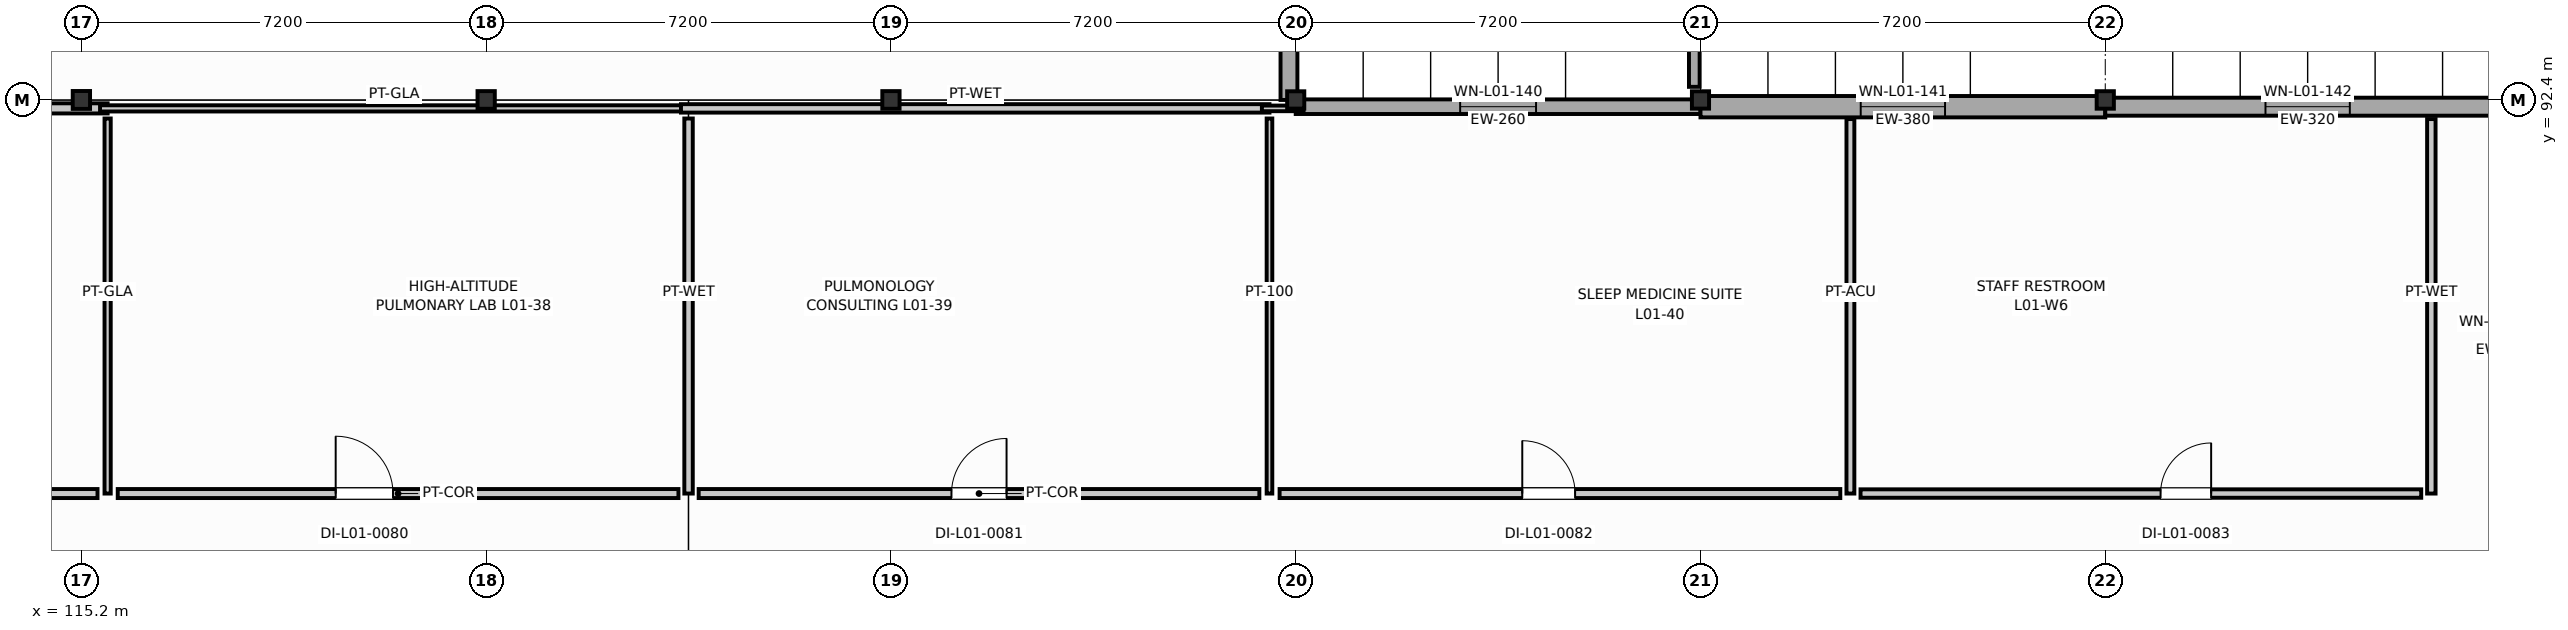
"""IFC4 building model, lengths in metres.
Left out: names, types, materials, properties, quantities, classifications, styles, units other than length and angle.
Written with IfcOpenShell. Run it as: python <this file> out.ifc"""

import sys

from ifc_helpers import new_model, si_unit, direction, frame, frame_2d, origin, origin_2d, place, context, subcontext, project, spatial, rectangle, i_section, extrude, element, fill, save


model = new_model("IFC4")
c1 = context("Model", 3, precision=1e-05, world=origin(), true_north=direction((0.0, 1.0)))
c2 = subcontext(c1, "Body", "Model", "MODEL_VIEW")
j1 = project(units=[si_unit("LENGTHUNIT", "METRE"), si_unit("PLANEANGLEUNIT", "RADIAN")], contexts=[c1])
p1 = place(None, origin())
s1 = spatial("IfcSite", under=j1, at=p1, CompositionType="ELEMENT")
p2 = place(p1, origin())
s2 = spatial("IfcBuilding", under=s1, at=p2, CompositionType="ELEMENT")
p3 = place(p2, frame((0.0, 0.0, 4.8)))
s3 = spatial("IfcBuildingStorey", under=s2, at=p3, CompositionType="ELEMENT", Elevation=4.8)
p4 = place(p3, frame((115.2, 92.4, 0.0), z_axis=(0.0, 0.0, 1.0), x_axis=(1.0, 0.0, 0.0)))
e1 = element("IfcColumn", 1, at=p4, inside=s3, PredefinedType="COLUMN", context=c2, shape_type="SweptSolid", body=[
    extrude(i_section(OverallWidth=0.308, OverallDepth=0.318, WebThickness=0.013, FlangeThickness=0.021, FilletRadius=0.016, at=origin_2d()), origin(), (0.0, 0.0, 1.0), 4.2),
])
for number, where, z_axis, x_axis in (
    (2, (122.4, 92.4, 0.0), (0.0, 0.0, 1.0), (1.0, 0.0, 0.0)),
    (3, (129.6, 92.4, 0.0), (0.0, 0.0, 1.0), (1.0, 0.0, 0.0)),
):
    element("IfcColumn", number, at=place(p3, frame(where, z_axis=z_axis, x_axis=x_axis)), inside=s3, PredefinedType="COLUMN", context=c2, shape_type="SweptSolid", body=[
        extrude(i_section(OverallWidth=0.307, OverallDepth=0.314, WebThickness=0.012, FlangeThickness=0.019, FilletRadius=0.016, at=origin_2d()), origin(), (0.0, 0.0, 1.0), 4.2),
    ])
for number, where, z_axis, x_axis in (
    (4, (136.8, 92.4, 0.0), (0.0, 0.0, 1.0), (1.0, 0.0, 0.0)),
    (5, (144.0, 92.4, 0.0), (0.0, 0.0, 1.0), (1.0, 0.0, 0.0)),
):
    element("IfcColumn", number, at=place(p3, frame(where, z_axis=z_axis, x_axis=x_axis)), inside=s3, PredefinedType="COLUMN", context=c2, shape_type="SweptSolid", body=[
        extrude(i_section(OverallWidth=0.305, OverallDepth=0.308, WebThickness=0.01, FlangeThickness=0.015, FilletRadius=0.015, at=origin_2d()), origin(), (0.0, 0.0, 1.0), 4.2),
    ])
p5 = place(p3, frame((151.2, 92.4, 0.0), z_axis=(0.0, 0.0, 1.0), x_axis=(1.0, 0.0, 0.0)))
e6 = element("IfcColumn", 6, at=p5, inside=s3, PredefinedType="COLUMN", context=c2, shape_type="SweptSolid", body=[
    extrude(i_section(OverallWidth=0.306, OverallDepth=0.311, WebThickness=0.011, FlangeThickness=0.017, FilletRadius=0.015, at=origin_2d()), origin(), (0.0, 0.0, 1.0), 4.2),
])
p6 = place(p3, frame((136.68, 92.4, 0.0), z_axis=(0.0, 0.0, 1.0), x_axis=(0.0, 1.0, 0.0)))
e7 = element("IfcWall", 7, at=p6, inside=s3, PredefinedType="SOLIDWALL", context=c2, shape_type="SweptSolid", body=[
    extrude(rectangle(XDim=8.4, YDim=0.3, at=frame_2d((4.2, 0.0))), origin(), (0.0, 0.0, 1.0), 3.015),
])
p7 = place(p6, frame((3.525, 0.0, 0.95)))
e8 = element("IfcOpeningElement", 8, at=p7, cuts=e7, PredefinedType="OPENING", context=c2, shape_type="SweptSolid", body=[
    extrude(rectangle(XDim=1.35, YDim=1.35, at=frame_2d((0.675, 0.675))), frame((0.0, 0.16, 0.0), z_axis=(0.0, -1.0, 0.0), x_axis=(1.0, 0.0, 0.0)), (0.0, 0.0, 1.0), 0.32),
])
p8 = place(p3, frame((136.8, 92.28, 0.0), z_axis=(0.0, 0.0, 1.0), x_axis=(1.0, 0.0, 0.0)))
e9 = element("IfcWall", 9, at=p8, inside=s3, PredefinedType="SOLIDWALL", context=c2, shape_type="SweptSolid", body=[
    extrude(rectangle(XDim=7.2, YDim=0.26, at=frame_2d((3.6, 0.0))), origin(), (0.0, 0.0, 1.0), 3.249),
])
p9 = place(p8, frame((2.925, 0.0, 0.95)))
e10 = element("IfcOpeningElement", 10, at=p9, cuts=e9, PredefinedType="OPENING", context=c2, shape_type="SweptSolid", body=[
    extrude(rectangle(XDim=1.35, YDim=1.75, at=frame_2d((0.675, 0.875))), frame((0.0, 0.14, 0.0), z_axis=(0.0, -1.0, 0.0), x_axis=(1.0, 0.0, 0.0)), (0.0, 0.0, 1.0), 0.28),
])
p10 = place(p3, frame((144.0, 92.28, 0.0), z_axis=(0.0, 0.0, 1.0), x_axis=(1.0, 0.0, 0.0)))
e11 = element("IfcWall", 11, at=p10, inside=s3, PredefinedType="SOLIDWALL", context=c2, shape_type="SweptSolid", body=[
    extrude(rectangle(XDim=7.2, YDim=0.38, at=frame_2d((3.6, 0.0))), origin(), (0.0, 0.0, 1.0), 3.249),
])
p11 = place(p10, frame((2.85, 0.0, 0.95)))
e12 = element("IfcOpeningElement", 12, at=p11, cuts=e11, PredefinedType="OPENING", context=c2, shape_type="SweptSolid", body=[
    extrude(rectangle(XDim=1.5, YDim=1.15, at=frame_2d((0.75, 0.575))), frame((0.0, 0.2, 0.0), z_axis=(0.0, -1.0, 0.0), x_axis=(1.0, 0.0, 0.0)), (0.0, 0.0, 1.0), 0.4),
])
p12 = place(p3, frame((151.2, 92.28, 0.0), z_axis=(0.0, 0.0, 1.0), x_axis=(1.0, 0.0, 0.0)))
e13 = element("IfcWall", 13, at=p12, inside=s3, PredefinedType="SOLIDWALL", context=c2, shape_type="SweptSolid", body=[
    extrude(rectangle(XDim=7.2, YDim=0.32, at=frame_2d((3.6, 0.0))), origin(), (0.0, 0.0, 1.0), 3.254),
])
p13 = place(p12, frame((2.85, 0.0, 0.95)))
e14 = element("IfcOpeningElement", 14, at=p13, cuts=e13, PredefinedType="OPENING", context=c2, shape_type="SweptSolid", body=[
    extrude(rectangle(XDim=1.5, YDim=1.35, at=frame_2d((0.75, 0.675))), frame((0.0, 0.17, 0.0), z_axis=(0.0, -1.0, 0.0), x_axis=(1.0, 0.0, 0.0)), (0.0, 0.0, 1.0), 0.34),
])
p14 = place(p3, frame((143.89, 108.98, 0.0), z_axis=(0.0, 0.0, 1.0), x_axis=(0.0, -1.0, 0.0)))
e15 = element("IfcWall", 15, at=p14, inside=s3, PredefinedType="PARAPET", context=c2, shape_type="SweptSolid", body=[
    extrude(rectangle(XDim=16.347, YDim=0.19, at=frame_2d((8.173, 0.0))), origin(), (0.0, 0.0, 1.0), 1.15),
])
p15 = place(p3, frame((105.198, 92.25, 0.0), z_axis=(0.0, 0.0, 1.0), x_axis=(1.0, 0.0, 0.0)))
e16 = element("IfcWall", 16, at=p15, inside=s3, PredefinedType="PARTITIONING", context=c2, shape_type="SweptSolid", body=[
    extrude(rectangle(XDim=10.469, YDim=0.18, at=frame_2d((5.234, 0.0))), origin(), (0.0, 0.0, 1.0), 3.252),
])
p16 = place(p3, frame((115.667, 92.07, 0.0), z_axis=(0.0, 0.0, 1.0), x_axis=(0.0, -1.0, 0.0)))
e17 = element("IfcWall", 17, at=p16, inside=s3, PredefinedType="MOVABLE", context=c2, shape_type="SweptSolid", body=[
    extrude(rectangle(XDim=6.67, YDim=0.11, at=frame_2d((3.335, 0.0))), origin(), (0.0, 0.0, 1.0), 3.945),
])
p17 = place(p3, frame((115.487, 85.4, 0.0), z_axis=(0.0, 0.0, 1.0), x_axis=(-1.0, 0.0, 0.0)))
e18 = element("IfcWall", 18, at=p17, inside=s3, PredefinedType="PARTITIONING", context=c2, shape_type="SweptSolid", body=[
    extrude(rectangle(XDim=9.974, YDim=0.16, at=frame_2d((4.987, 0.0))), origin(), (0.0, 0.0, 1.0), 3.252),
])
p18 = place(p17, frame((4.657, 0.0, 0.0)))
e19 = element("IfcOpeningElement", 19, at=p18, cuts=e18, PredefinedType="OPENING", context=c2, shape_type="SweptSolid", body=[
    extrude(rectangle(XDim=1.06, YDim=2.05, at=frame_2d((0.53, 1.025))), frame((0.0, 0.09, 0.0), z_axis=(0.0, -1.0, 0.0), x_axis=(1.0, 0.0, 0.0)), (0.0, 0.0, 1.0), 0.18),
])
p19 = place(p3, frame((115.532, 92.25, 0.0), z_axis=(0.0, 0.0, 1.0), x_axis=(1.0, 0.0, 0.0)))
e20 = element("IfcWall", 20, at=p19, inside=s3, PredefinedType="MOVABLE", context=c2, shape_type="SweptSolid", body=[
    extrude(rectangle(XDim=10.468, YDim=0.11, at=frame_2d((5.234, 0.0))), origin(), (0.0, 0.0, 1.0), 3.401),
])
p20 = place(p3, frame((126.0, 92.07, 0.0), z_axis=(0.0, 0.0, 1.0), x_axis=(0.0, -1.0, 0.0)))
e21 = element("IfcWall", 21, at=p20, inside=s3, PredefinedType="PLUMBINGWALL", context=c2, shape_type="SweptSolid", body=[
    extrude(rectangle(XDim=6.67, YDim=0.15, at=frame_2d((3.335, 0.0))), origin(), (0.0, 0.0, 1.0), 3.587),
])
p21 = place(p3, frame((125.82, 85.4, 0.0), z_axis=(0.0, 0.0, 1.0), x_axis=(-1.0, 0.0, 0.0)))
e22 = element("IfcWall", 22, at=p21, inside=s3, PredefinedType="PARTITIONING", context=c2, shape_type="SweptSolid", body=[
    extrude(rectangle(XDim=9.973, YDim=0.16, at=frame_2d((4.987, 0.0))), origin(), (0.0, 0.0, 1.0), 3.401),
])
p22 = place(p21, frame((5.077, 0.0, 0.0)))
e23 = element("IfcOpeningElement", 23, at=p22, cuts=e22, PredefinedType="OPENING", context=c2, shape_type="SweptSolid", body=[
    extrude(rectangle(XDim=1.02, YDim=2.05, at=frame_2d((0.51, 1.025))), frame((0.0, 0.09, 0.0), z_axis=(0.0, -1.0, 0.0), x_axis=(1.0, 0.0, 0.0)), (0.0, 0.0, 1.0), 0.18),
])
p23 = place(p3, frame((125.865, 92.25, 0.0), z_axis=(0.0, 0.0, 1.0), x_axis=(1.0, 0.0, 0.0)))
e24 = element("IfcWall", 24, at=p23, inside=s3, PredefinedType="PLUMBINGWALL", context=c2, shape_type="SweptSolid", body=[
    extrude(rectangle(XDim=10.468, YDim=0.15, at=frame_2d((5.234, 0.0))), origin(), (0.0, 0.0, 1.0), 3.018),
])
p24 = place(p3, frame((136.333, 92.07, 0.0), z_axis=(0.0, 0.0, 1.0), x_axis=(0.0, -1.0, 0.0)))
e25 = element("IfcWall", 25, at=p24, inside=s3, PredefinedType="PARTITIONING", context=c2, shape_type="SweptSolid", body=[
    extrude(rectangle(XDim=6.67, YDim=0.1, at=frame_2d((3.335, 0.0))), origin(), (0.0, 0.0, 1.0), 3.945),
])
p25 = place(p3, frame((136.153, 85.4, 0.0), z_axis=(0.0, 0.0, 1.0), x_axis=(-1.0, 0.0, 0.0)))
e26 = element("IfcWall", 26, at=p25, inside=s3, PredefinedType="PARTITIONING", context=c2, shape_type="SweptSolid", body=[
    extrude(rectangle(XDim=9.973, YDim=0.16, at=frame_2d((4.987, 0.0))), origin(), (0.0, 0.0, 1.0), 3.094),
])
p26 = place(p25, frame((4.497, 0.0, 0.0)))
e27 = element("IfcOpeningElement", 27, at=p26, cuts=e26, PredefinedType="OPENING", context=c2, shape_type="SweptSolid", body=[
    extrude(rectangle(XDim=0.98, YDim=2.05, at=frame_2d((0.49, 1.025))), frame((0.0, 0.09, 0.0), z_axis=(0.0, -1.0, 0.0), x_axis=(1.0, 0.0, 0.0)), (0.0, 0.0, 1.0), 0.18),
])
p27 = place(p3, frame((136.198, 92.25, 0.0), z_axis=(0.0, 0.0, 1.0), x_axis=(1.0, 0.0, 0.0)))
e28 = element("IfcWall", 28, at=p27, inside=s3, PredefinedType="PARTITIONING", context=c2, shape_type="SweptSolid", body=[
    extrude(rectangle(XDim=0.742, YDim=0.1, at=frame_2d((0.371, 0.0))), origin(), (0.0, 0.0, 1.0), 3.018),
])
p28 = place(p3, frame((146.667, 92.06, 0.0), z_axis=(0.0, 0.0, 1.0), x_axis=(0.0, -1.0, 0.0)))
e29 = element("IfcWall", 29, at=p28, inside=s3, PredefinedType="PARTITIONING", context=c2, shape_type="SweptSolid", body=[
    extrude(rectangle(XDim=6.66, YDim=0.14, at=frame_2d((3.33, 0.0))), origin(), (0.0, 0.0, 1.0), 3.945),
])
p29 = place(p3, frame((146.487, 85.4, 0.0), z_axis=(0.0, 0.0, 1.0), x_axis=(-1.0, 0.0, 0.0)))
e30 = element("IfcWall", 30, at=p29, inside=s3, PredefinedType="PARTITIONING", context=c2, shape_type="SweptSolid", body=[
    extrude(rectangle(XDim=9.974, YDim=0.16, at=frame_2d((4.987, 0.0))), origin(), (0.0, 0.0, 1.0), 3.408),
])
p30 = place(p29, frame((4.717, 0.0, 0.0)))
e31 = element("IfcOpeningElement", 31, at=p30, cuts=e30, PredefinedType="OPENING", context=c2, shape_type="SweptSolid", body=[
    extrude(rectangle(XDim=0.94, YDim=2.05, at=frame_2d((0.47, 1.025))), frame((0.0, 0.09, 0.0), z_axis=(0.0, -1.0, 0.0), x_axis=(1.0, 0.0, 0.0)), (0.0, 0.0, 1.0), 0.18),
])
p31 = place(p3, frame((157.0, 92.06, 0.0), z_axis=(0.0, 0.0, 1.0), x_axis=(0.0, -1.0, 0.0)))
e32 = element("IfcWall", 32, at=p31, inside=s3, PredefinedType="PLUMBINGWALL", context=c2, shape_type="SweptSolid", body=[
    extrude(rectangle(XDim=6.66, YDim=0.15, at=frame_2d((3.33, 0.0))), origin(), (0.0, 0.0, 1.0), 3.945),
])
p32 = place(p3, frame((156.82, 85.4, 0.0), z_axis=(0.0, 0.0, 1.0), x_axis=(-1.0, 0.0, 0.0)))
e33 = element("IfcWall", 33, at=p32, inside=s3, PredefinedType="PLUMBINGWALL", context=c2, shape_type="SweptSolid", body=[
    extrude(rectangle(XDim=9.973, YDim=0.15, at=frame_2d((4.987, 0.0))), origin(), (0.0, 0.0, 1.0), 3.485),
])
p33 = place(p32, frame((3.737, 0.0, 0.0)))
e34 = element("IfcOpeningElement", 34, at=p33, cuts=e33, PredefinedType="OPENING", context=c2, shape_type="SweptSolid", body=[
    extrude(rectangle(XDim=0.9, YDim=2.1, at=frame_2d((0.45, 1.05))), frame((0.0, 0.085, 0.0), z_axis=(0.0, -1.0, 0.0), x_axis=(1.0, 0.0, 0.0)), (0.0, 0.0, 1.0), 0.17),
])
p34 = place(p9, origin())
e35 = element("IfcWindow", 35, at=p34, inside=s3, PartitioningType="SINGLE_PANEL", PredefinedType="WINDOW", context=c2, shape_type="SweptSolid", body=[
    extrude(rectangle(XDim=1.35, YDim=1.75, at=frame_2d((0.675, 0.875))), frame((0.0, 0.03, 0.0), z_axis=(0.0, -1.0, 0.0), x_axis=(1.0, 0.0, 0.0)), (0.0, 0.0, 1.0), 0.06),
])
fill(e10, e35)
p35 = place(p11, origin())
e36 = element("IfcWindow", 36, at=p35, inside=s3, PartitioningType="SINGLE_PANEL", PredefinedType="WINDOW", context=c2, shape_type="SweptSolid", body=[
    extrude(rectangle(XDim=1.5, YDim=1.15, at=frame_2d((0.75, 0.575))), frame((0.0, 0.03, 0.0), z_axis=(0.0, -1.0, 0.0), x_axis=(1.0, 0.0, 0.0)), (0.0, 0.0, 1.0), 0.06),
])
fill(e12, e36)
p36 = place(p13, origin())
e37 = element("IfcWindow", 37, at=p36, inside=s3, PartitioningType="SINGLE_PANEL", PredefinedType="WINDOW", context=c2, shape_type="SweptSolid", body=[
    extrude(rectangle(XDim=1.5, YDim=1.35, at=frame_2d((0.75, 0.675))), frame((0.0, 0.03, 0.0), z_axis=(0.0, -1.0, 0.0), x_axis=(1.0, 0.0, 0.0)), (0.0, 0.0, 1.0), 0.06),
])
fill(e14, e37)
p37 = place(p22, frame((1.02, 0.0, 0.0), z_axis=(0.0, 0.0, 1.0), x_axis=(-1.0, 0.0, 0.0)))
e38 = element("IfcDoor", 38, at=p37, inside=s3, OperationType="SINGLE_SWING_LEFT", PredefinedType="DOOR", context=c2, shape_type="SweptSolid", body=[
    extrude(rectangle(XDim=1.02, YDim=2.05, at=frame_2d((0.51, 1.025))), frame((0.0, 0.025, 0.0), z_axis=(0.0, -1.0, 0.0), x_axis=(1.0, 0.0, 0.0)), (0.0, 0.0, 1.0), 0.05),
])
fill(e23, e38)
p38 = place(p26, frame((0.98, 0.0, 0.0), z_axis=(0.0, 0.0, 1.0), x_axis=(-1.0, 0.0, 0.0)))
e39 = element("IfcDoor", 39, at=p38, inside=s3, OperationType="SINGLE_SWING_RIGHT", PredefinedType="DOOR", context=c2, shape_type="SweptSolid", body=[
    extrude(rectangle(XDim=0.98, YDim=2.05, at=frame_2d((0.49, 1.025))), frame((0.0, 0.025, 0.0), z_axis=(0.0, -1.0, 0.0), x_axis=(1.0, 0.0, 0.0)), (0.0, 0.0, 1.0), 0.05),
])
fill(e27, e39)
p39 = place(p30, frame((0.94, 0.0, 0.0), z_axis=(0.0, 0.0, 1.0), x_axis=(-1.0, 0.0, 0.0)))
e40 = element("IfcDoor", 40, at=p39, inside=s3, OperationType="SINGLE_SWING_LEFT", PredefinedType="DOOR", context=c2, shape_type="SweptSolid", body=[
    extrude(rectangle(XDim=0.94, YDim=2.05, at=frame_2d((0.47, 1.025))), frame((0.0, 0.025, 0.0), z_axis=(0.0, -1.0, 0.0), x_axis=(1.0, 0.0, 0.0)), (0.0, 0.0, 1.0), 0.05),
])
fill(e31, e40)
p40 = place(p33, frame((0.9, 0.0, 0.0), z_axis=(0.0, 0.0, 1.0), x_axis=(-1.0, 0.0, 0.0)))
e41 = element("IfcDoor", 41, at=p40, inside=s3, OperationType="SINGLE_SWING_RIGHT", PredefinedType="DOOR", context=c2, shape_type="SweptSolid", body=[
    extrude(rectangle(XDim=0.9, YDim=2.1, at=frame_2d((0.45, 1.05))), frame((0.0, 0.025, 0.0), z_axis=(0.0, -1.0, 0.0), x_axis=(1.0, 0.0, 0.0)), (0.0, 0.0, 1.0), 0.05),
])
fill(e34, e41)
save(model, sys.argv[1])
